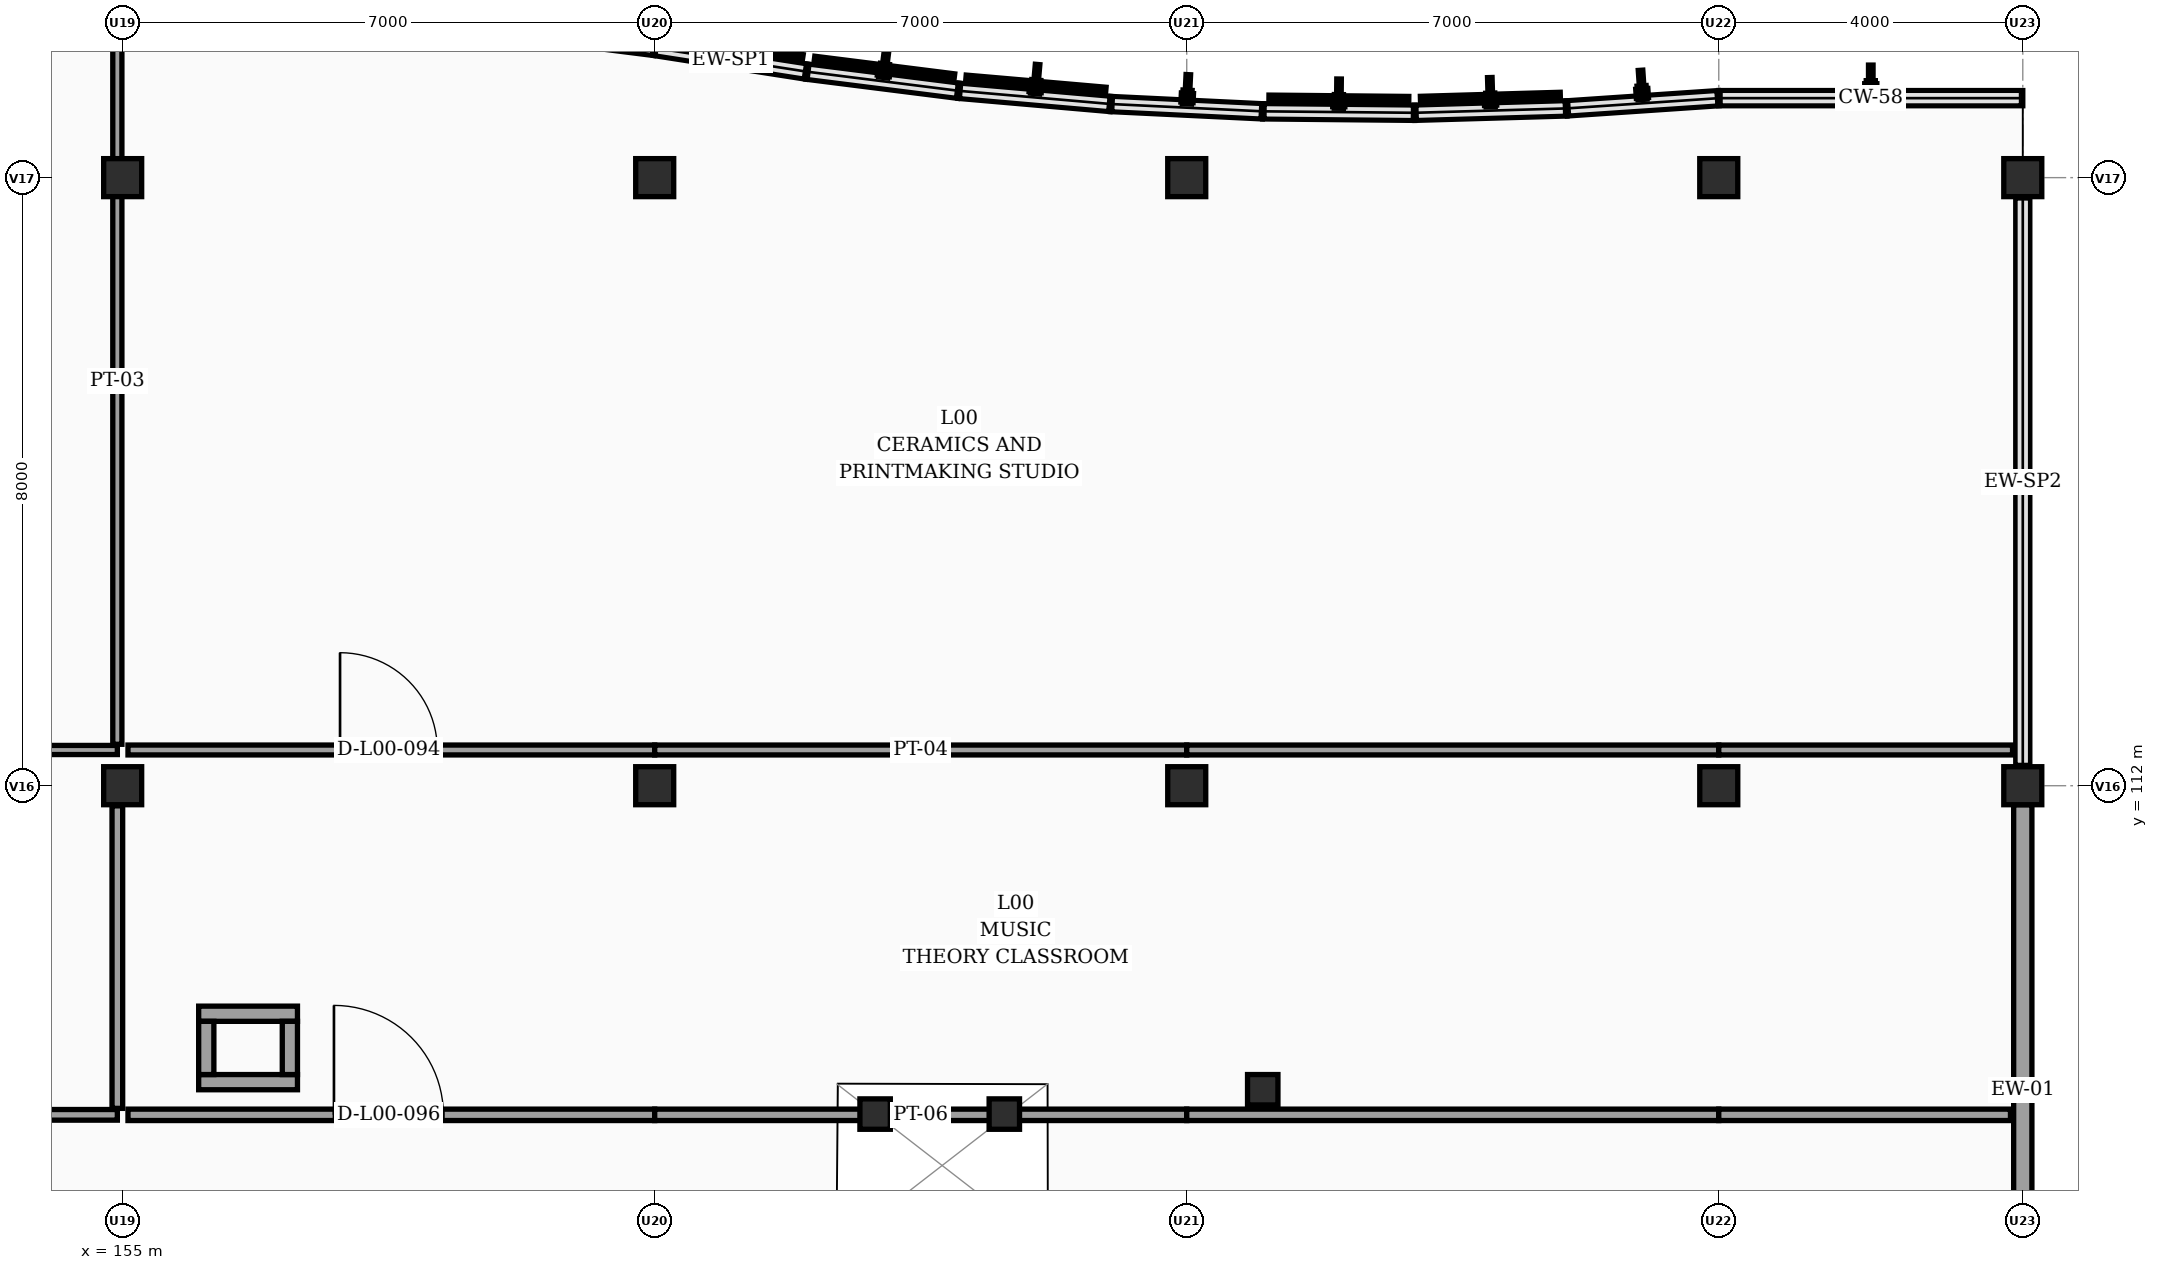
"""IFC4 building model, lengths in metres.
Left out: names, types, materials, properties, quantities, classifications, styles, units other than length and angle.
Written with IfcOpenShell. Run it as: python <this file> out.ifc"""

import sys

from ifc_helpers import new_model, si_unit, direction, frame, frame_2d, origin, origin_2d, place, context, subcontext, project, spatial, rectangle, extrude, element, fill, save


model = new_model("IFC4")
c1 = context("Model", 3, precision=1e-05, world=origin(), true_north=direction((0.0, 1.0)))
c2 = subcontext(c1, "Body", "Model", "MODEL_VIEW")
j1 = project(units=[si_unit("LENGTHUNIT", "METRE"), si_unit("PLANEANGLEUNIT", "RADIAN")], contexts=[c1])
p1 = place(None, origin())
s1 = spatial("IfcSite", under=j1, at=p1, CompositionType="ELEMENT")
p2 = place(p1, origin())
s2 = spatial("IfcBuilding", under=s1, at=p2, CompositionType="ELEMENT")
p3 = place(p2, origin())
s3 = spatial("IfcBuildingStorey", under=s2, at=p3, CompositionType="ELEMENT", Elevation=0.0)
for number, where, z_axis, x_axis in (
    (1, (155.0, 112.0, -0.2), (0.0, 0.0, 1.0), (1.0, 0.0, 0.0)),
    (2, (155.0, 120.0, -0.2), (0.0, 0.0, 1.0), (1.0, 0.0, 0.0)),
    (3, (162.0, 112.0, -0.2), (0.0, 0.0, 1.0), (1.0, 0.0, 0.0)),
    (4, (162.0, 120.0, -0.2), (0.0, 0.0, 1.0), (1.0, 0.0, 0.0)),
    (5, (169.0, 112.0, -0.2), (0.0, 0.0, 1.0), (1.0, 0.0, 0.0)),
    (6, (169.0, 120.0, -0.2), (0.0, 0.0, 1.0), (1.0, 0.0, 0.0)),
    (7, (176.0, 112.0, -0.2), (0.0, 0.0, 1.0), (1.0, 0.0, 0.0)),
    (8, (176.0, 120.0, -0.2), (0.0, 0.0, 1.0), (1.0, 0.0, 0.0)),
    (9, (180.0, 112.0, -0.2), (0.0, 0.0, 1.0), (1.0, 0.0, 0.0)),
    (10, (180.0, 120.0, -0.2), (0.0, 0.0, 1.0), (1.0, 0.0, 0.0)),
):
    element("IfcColumn", number, at=place(p3, frame(where, z_axis=z_axis, x_axis=x_axis)), inside=s3, PredefinedType="COLUMN", context=c2, shape_type="SweptSolid", body=[
        extrude(rectangle(XDim=0.5, YDim=0.5, at=origin_2d()), origin(), (0.0, 0.0, 1.0), 4.7),
    ])
p4 = place(p3, frame((170.0, 108.0, -0.2), z_axis=(0.0, 0.0, 1.0), x_axis=(1.0, 0.0, 0.0)))
e11 = element("IfcColumn", 11, at=p4, inside=s3, PredefinedType="COLUMN", context=c2, shape_type="SweptSolid", body=[
    extrude(rectangle(XDim=0.4, YDim=0.4, at=origin_2d()), origin(), (0.0, 0.0, 1.0), 4.7),
])
p5 = place(p3, frame((160.0, 121.958, 0.0), z_axis=(0.0, 0.0, 1.0), x_axis=(0.992158168336, -0.124988675503, 0.0)))
e12 = element("IfcWall", 12, at=p5, inside=s3, PredefinedType="SOLIDWALL", context=c2, shape_type="SweptSolid", body=[
    extrude(rectangle(XDim=2.016, YDim=0.2, at=frame_2d((1.008, 0.0))), origin(), (0.0, 0.0, 1.0), 0.95),
])
p6 = place(p3, frame((162.0, 121.706, 0.0), z_axis=(0.0, 0.0, 1.0), x_axis=(0.988085509852, -0.153905897287, 0.0)))
e13 = element("IfcWall", 13, at=p6, inside=s3, PredefinedType="SOLIDWALL", context=c2, shape_type="SweptSolid", body=[
    extrude(rectangle(XDim=2.024, YDim=0.2, at=frame_2d((1.012, 0.0))), origin(), (0.0, 0.0, 1.0), 0.95),
])
p7 = place(p3, frame((164.0, 121.394, 0.0), z_axis=(0.0, 0.0, 1.0), x_axis=(0.992158168336, -0.124988675503, 0.0)))
e14 = element("IfcWall", 14, at=p7, inside=s3, PredefinedType="SOLIDWALL", context=c2, shape_type="SweptSolid", body=[
    extrude(rectangle(XDim=2.016, YDim=0.2, at=frame_2d((1.008, 0.0))), origin(), (0.0, 0.0, 1.0), 0.95),
])
p8 = place(p3, frame((166.0, 121.142, 0.0), z_axis=(0.0, 0.0, 1.0), x_axis=(0.996244237948, -0.086587633962, 0.0)))
e15 = element("IfcWall", 15, at=p8, inside=s3, PredefinedType="SOLIDWALL", context=c2, shape_type="SweptSolid", body=[
    extrude(rectangle(XDim=2.008, YDim=0.2, at=frame_2d((1.004, 0.0))), origin(), (0.0, 0.0, 1.0), 0.95),
])
p9 = place(p3, frame((168.0, 120.969, 0.0), z_axis=(0.0, 0.0, 1.0), x_axis=(0.99884540439, -0.048040172037, 0.0)))
e16 = element("IfcWall", 16, at=p9, inside=s3, PredefinedType="SOLIDWALL", context=c2, shape_type="SweptSolid", body=[
    extrude(rectangle(XDim=2.002, YDim=0.2, at=frame_2d((1.001, 0.0))), origin(), (0.0, 0.0, 1.0), 0.95),
])
p10 = place(p3, frame((170.0, 120.872, 0.0), z_axis=(0.0, 0.0, 1.0), x_axis=(0.999953504169, -0.009643106302, 0.0)))
e17 = element("IfcWall", 17, at=p10, inside=s3, PredefinedType="SOLIDWALL", context=c2, shape_type="SweptSolid", body=[
    extrude(rectangle(XDim=2.0, YDim=0.2, at=frame_2d((1.0, 0.0))), origin(), (0.0, 0.0, 1.0), 0.95),
])
p11 = place(p3, frame((172.0, 120.853, 0.0), z_axis=(0.0, 0.0, 1.0), x_axis=(0.999585290582, 0.028796646555, 0.0)))
e18 = element("IfcWall", 18, at=p11, inside=s3, PredefinedType="SOLIDWALL", context=c2, shape_type="SweptSolid", body=[
    extrude(rectangle(XDim=2.001, YDim=0.2, at=frame_2d((1.0, 0.0))), origin(), (0.0, 0.0, 1.0), 0.95),
])
p12 = place(p3, frame((174.0, 120.911, 0.0), z_axis=(0.0, 0.0, 1.0), x_axis=(0.997729302978, 0.067351599676, 0.0)))
e19 = element("IfcWall", 19, at=p12, inside=s3, PredefinedType="SOLIDWALL", context=c2, shape_type="SweptSolid", body=[
    extrude(rectangle(XDim=2.005, YDim=0.2, at=frame_2d((1.002, 0.0))), origin(), (0.0, 0.0, 1.0), 0.95),
])
p13 = place(p3, frame((176.0, 121.046, 0.0), z_axis=(0.0, 0.0, 1.0), x_axis=(1.0, 0.0, 0.0)))
e20 = element("IfcWall", 20, at=p13, inside=s3, PredefinedType="SOLIDWALL", context=c2, shape_type="SweptSolid", body=[
    extrude(rectangle(XDim=4.0, YDim=0.2, at=frame_2d((2.0, 0.0))), origin(), (0.0, 0.0, 1.0), 0.95),
])
p14 = place(p3, frame((180.0, 119.75, 0.0), z_axis=(0.0, 0.0, 1.0), x_axis=(0.0, -1.0, 0.0)))
e21 = element("IfcWall", 21, at=p14, inside=s3, PredefinedType="SOLIDWALL", context=c2, shape_type="SweptSolid", body=[
    extrude(rectangle(XDim=7.5, YDim=0.185, at=frame_2d((3.75, 0.0))), origin(), (0.0, 0.0, 1.0), 0.95),
])
p15 = place(p3, frame((180.0, 111.75, 0.0), z_axis=(0.0, 0.0, 1.0), x_axis=(0.0, -1.0, 0.0)))
e22 = element("IfcWall", 22, at=p15, inside=s3, PredefinedType="SOLIDWALL", context=c2, shape_type="SweptSolid", body=[
    extrude(rectangle(XDim=7.5, YDim=0.24, at=frame_2d((3.75, 0.0))), origin(), (0.0, 0.0, 1.0), 3.54),
])
p16 = place(p15, frame((5.4, 0.0, 0.0)))
e23 = element("IfcOpeningElement", 23, at=p16, cuts=e22, PredefinedType="OPENING", context=c2, shape_type="SweptSolid", body=[
    extrude(rectangle(XDim=1.8, YDim=2.2, at=frame_2d((0.9, 1.1))), frame((0.0, 0.13, 0.0), z_axis=(0.0, -1.0, 0.0), x_axis=(1.0, 0.0, 0.0)), (0.0, 0.0, 1.0), 0.26),
])
for number, where, z_axis, x_axis in (
    (24, (157.3, 108.1, 0.0), (0.0, 0.0, 1.0), (-1.0, 0.0, 0.0)),
    (25, (156.0, 109.0, 0.0), (0.0, 0.0, 1.0), (1.0, 0.0, 0.0)),
):
    element("IfcWall", number, at=place(p3, frame(where, z_axis=z_axis, x_axis=x_axis)), inside=s3, PredefinedType="PARTITIONING", context=c2, shape_type="SweptSolid", body=[
        extrude(rectangle(XDim=1.3, YDim=0.2, at=frame_2d((0.65, 0.0))), origin(), (0.0, 0.0, 1.0), 4.24),
    ])
p17 = place(p3, frame((156.1, 108.2, 0.0), z_axis=(0.0, 0.0, 1.0), x_axis=(0.0, 1.0, 0.0)))
e26 = element("IfcWall", 26, at=p17, inside=s3, PredefinedType="PARTITIONING", context=c2, shape_type="SweptSolid", body=[
    extrude(rectangle(XDim=0.7, YDim=0.2, at=frame_2d((0.35, 0.0))), origin(), (0.0, 0.0, 1.0), 4.24),
])
p18 = place(p3, frame((157.2, 108.9, 0.0), z_axis=(0.0, 0.0, 1.0), x_axis=(0.0, -1.0, 0.0)))
e27 = element("IfcWall", 27, at=p18, inside=s3, PredefinedType="PARTITIONING", context=c2, shape_type="SweptSolid", body=[
    extrude(rectangle(XDim=0.7, YDim=0.2, at=frame_2d((0.35, 0.0))), origin(), (0.0, 0.0, 1.0), 3.84),
])
for number, where, z_axis, x_axis in (
    (28, (166.6, 107.68, -0.005), (0.0, 0.0, 1.0), (1.0, 0.0, 0.0)),
    (29, (164.9, 107.68, -0.005), (0.0, 0.0, 1.0), (1.0, 0.0, 0.0)),
):
    element("IfcColumn", number, at=place(p3, frame(where, z_axis=z_axis, x_axis=x_axis)), inside=s3, PredefinedType="COLUMN", context=c2, shape_type="SweptSolid", body=[
        extrude(rectangle(XDim=0.4, YDim=0.4, at=origin_2d()), origin(), (0.0, 0.0, 1.0), 4.505),
    ])
p19 = place(p3, frame((148.0, 112.47, 0.0), z_axis=(0.0, 0.0, 1.0), x_axis=(1.0, 0.0, 0.0)))
e30 = element("IfcWall", 30, at=p19, inside=s3, PredefinedType="PARTITIONING", context=c2, shape_type="SweptSolid", body=[
    extrude(rectangle(XDim=6.93, YDim=0.12, at=frame_2d((3.465, 0.0))), origin(), (0.0, 0.0, 1.0), 3.59),
])
p20 = place(p3, frame((154.93, 112.545, 0.0), z_axis=(0.0, 0.0, 1.0), x_axis=(0.0, 1.0, 0.0)))
e31 = element("IfcWall", 31, at=p20, inside=s3, PredefinedType="PARTITIONING", context=c2, shape_type="SweptSolid", body=[
    extrude(rectangle(XDim=9.551, YDim=0.12, at=frame_2d((4.776, 0.0))), origin(), (0.0, 0.0, 1.0), 3.59),
])
p21 = place(p3, frame((155.07, 112.47, 0.0), z_axis=(0.0, 0.0, 1.0), x_axis=(1.0, 0.0, 0.0)))
e32 = element("IfcWall", 32, at=p21, inside=s3, PredefinedType="PARTITIONING", context=c2, shape_type="SweptSolid", body=[
    extrude(rectangle(XDim=6.93, YDim=0.13, at=frame_2d((3.465, 0.0))), origin(), (0.0, 0.0, 1.0), 3.59),
])
p22 = place(p21, frame((2.79, 0.0, 0.0)))
e33 = element("IfcOpeningElement", 33, at=p22, cuts=e32, PredefinedType="OPENING", context=c2, shape_type="SweptSolid", body=[
    extrude(rectangle(XDim=1.28, YDim=2.15, at=frame_2d((0.64, 1.075))), frame((0.0, 0.075, 0.0), z_axis=(0.0, -1.0, 0.0), x_axis=(1.0, 0.0, 0.0)), (0.0, 0.0, 1.0), 0.15),
])
for number, where, z_axis, x_axis in (
    (34, (162.0, 112.47, 0.0), (0.0, 0.0, 1.0), (1.0, 0.0, 0.0)),
    (35, (169.0, 112.47, 0.0), (0.0, 0.0, 1.0), (1.0, 0.0, 0.0)),
):
    element("IfcWall", number, at=place(p3, frame(where, z_axis=z_axis, x_axis=x_axis)), inside=s3, PredefinedType="PARTITIONING", context=c2, shape_type="SweptSolid", body=[
        extrude(rectangle(XDim=7.0, YDim=0.13, at=frame_2d((3.5, 0.0))), origin(), (0.0, 0.0, 1.0), 3.59),
    ])
p23 = place(p3, frame((176.0, 112.47, 0.0), z_axis=(0.0, 0.0, 1.0), x_axis=(1.0, 0.0, 0.0)))
e36 = element("IfcWall", 36, at=p23, inside=s3, PredefinedType="PARTITIONING", context=c2, shape_type="SweptSolid", body=[
    extrude(rectangle(XDim=3.865, YDim=0.13, at=frame_2d((1.933, 0.0))), origin(), (0.0, 0.0, 1.0), 3.59),
])
p24 = place(p3, frame((148.0, 107.67, 0.0), z_axis=(0.0, 0.0, 1.0), x_axis=(1.0, 0.0, 0.0)))
e37 = element("IfcWall", 37, at=p24, inside=s3, PredefinedType="PARTITIONING", context=c2, shape_type="SweptSolid", body=[
    extrude(rectangle(XDim=6.93, YDim=0.14, at=frame_2d((3.465, 0.0))), origin(), (0.0, 0.0, 1.0), 4.24),
])
p25 = place(p3, frame((154.93, 107.755, 0.0), z_axis=(0.0, 0.0, 1.0), x_axis=(0.0, 1.0, 0.0)))
e38 = element("IfcWall", 38, at=p25, inside=s3, PredefinedType="PARTITIONING", context=c2, shape_type="SweptSolid", body=[
    extrude(rectangle(XDim=3.98, YDim=0.14, at=frame_2d((1.99, 0.0))), origin(), (0.0, 0.0, 1.0), 3.59),
])
p26 = place(p3, frame((155.07, 107.67, 0.0), z_axis=(0.0, 0.0, 1.0), x_axis=(1.0, 0.0, 0.0)))
e39 = element("IfcWall", 39, at=p26, inside=s3, PredefinedType="PARTITIONING", context=c2, shape_type="SweptSolid", body=[
    extrude(rectangle(XDim=6.93, YDim=0.15, at=frame_2d((3.465, 0.0))), origin(), (0.0, 0.0, 1.0), 4.24),
])
p27 = place(p26, frame((2.71, 0.0, 0.0)))
e40 = element("IfcOpeningElement", 40, at=p27, cuts=e39, PredefinedType="OPENING", context=c2, shape_type="SweptSolid", body=[
    extrude(rectangle(XDim=1.44, YDim=2.15, at=frame_2d((0.72, 1.075))), frame((0.0, 0.085, 0.0), z_axis=(0.0, -1.0, 0.0), x_axis=(1.0, 0.0, 0.0)), (0.0, 0.0, 1.0), 0.17),
])
for number, where, z_axis, x_axis in (
    (41, (162.0, 107.67, 0.0), (0.0, 0.0, 1.0), (1.0, 0.0, 0.0)),
    (42, (169.0, 107.67, 0.0), (0.0, 0.0, 1.0), (1.0, 0.0, 0.0)),
):
    element("IfcWall", number, at=place(p3, frame(where, z_axis=z_axis, x_axis=x_axis)), inside=s3, PredefinedType="PARTITIONING", context=c2, shape_type="SweptSolid", body=[
        extrude(rectangle(XDim=7.0, YDim=0.15, at=frame_2d((3.5, 0.0))), origin(), (0.0, 0.0, 1.0), 4.24),
    ])
p28 = place(p3, frame((176.0, 107.67, 0.0), z_axis=(0.0, 0.0, 1.0), x_axis=(1.0, 0.0, 0.0)))
e43 = element("IfcWall", 43, at=p28, inside=s3, PredefinedType="PARTITIONING", context=c2, shape_type="SweptSolid", body=[
    extrude(rectangle(XDim=3.838, YDim=0.15, at=frame_2d((1.919, 0.0))), origin(), (0.0, 0.0, 1.0), 4.24),
])
p29 = place(p22, origin())
e44 = element("IfcDoor", 44, at=p29, inside=s3, OperationType="SINGLE_SWING_LEFT", PredefinedType="DOOR", context=c2, shape_type="SweptSolid", body=[
    extrude(rectangle(XDim=1.28, YDim=2.15, at=frame_2d((0.64, 1.075))), frame((0.0, 0.025, 0.0), z_axis=(0.0, -1.0, 0.0), x_axis=(1.0, 0.0, 0.0)), (0.0, 0.0, 1.0), 0.05),
])
fill(e33, e44)
p30 = place(p27, origin())
e45 = element("IfcDoor", 45, at=p30, inside=s3, OperationType="SINGLE_SWING_LEFT", PredefinedType="DOOR", context=c2, shape_type="SweptSolid", body=[
    extrude(rectangle(XDim=1.44, YDim=2.15, at=frame_2d((0.72, 1.075))), frame((0.0, 0.025, 0.0), z_axis=(0.0, -1.0, 0.0), x_axis=(1.0, 0.0, 0.0)), (0.0, 0.0, 1.0), 0.05),
])
fill(e40, e45)
save(model, sys.argv[1])
